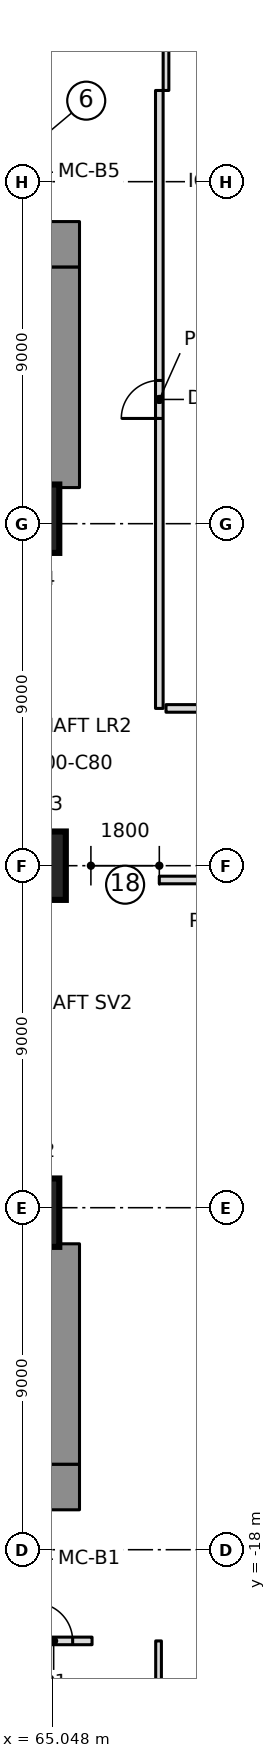
"""IFC4 building model, lengths in metres.
Left out: names, types, materials, properties, quantities, classifications, styles, units other than length and angle.
Written with IfcOpenShell. Run it as: python <this file> out.ifc"""

import sys

from ifc_helpers import new_model, si_unit, direction, frame, frame_2d, origin, origin_2d, place, context, subcontext, project, spatial, rectangle, extrude, element, fill, save


model = new_model("IFC4")
c1 = context("Model", 3, precision=1e-05, world=origin(), true_north=direction((0.0, 1.0)))
c2 = subcontext(c1, "Body", "Model", "MODEL_VIEW")
j1 = project(units=[si_unit("LENGTHUNIT", "METRE"), si_unit("PLANEANGLEUNIT", "RADIAN")], contexts=[c1])
p1 = place(None, origin())
s1 = spatial("IfcSite", under=j1, at=p1, CompositionType="ELEMENT")
p2 = place(p1, origin())
s2 = spatial("IfcBuilding", under=s1, at=p2, CompositionType="ELEMENT")
p3 = place(p2, origin())
s3 = spatial("IfcBuildingStorey", under=s2, at=p3, CompositionType="ELEMENT", Elevation=0.0)
for number, where, z_axis, x_axis in (
    (1, (50.7, 16.35, 0.0), (0.0, 0.0, 1.0), (1.0, 0.0, 0.0)),
    (2, (50.7, -16.35, 0.0), (0.0, 0.0, 1.0), (1.0, 0.0, 0.0)),
):
    element("IfcWall", number, at=place(p3, frame(where, z_axis=z_axis, x_axis=x_axis)), inside=s3, PredefinedType="SHEAR", context=c2, shape_type="SweptSolid", body=[
        extrude(rectangle(XDim=15.06, YDim=1.2, at=frame_2d((7.53, 0.0))), origin(), (0.0, 0.0, 1.0), 8.0),
    ])
for number, where, z_axis, x_axis in (
    (3, (65.16, 9.95, 0.0), (0.0, 0.0, 1.0), (0.0, 1.0, 0.0)),
    (4, (65.16, -15.75, 0.0), (0.0, 0.0, 1.0), (0.0, 1.0, 0.0)),
):
    element("IfcWall", number, at=place(p3, frame(where, z_axis=z_axis, x_axis=x_axis)), inside=s3, PredefinedType="SHEAR", context=c2, shape_type="SweptSolid", body=[
        extrude(rectangle(XDim=5.8, YDim=1.2, at=frame_2d((2.9, 0.0))), origin(), (0.0, 0.0, 1.0), 8.0),
    ])
for number, where, z_axis, x_axis in (
    (5, (64.328, -9.131, 0.0), (0.0, 0.0, 1.0), (1.0, 0.0, 0.0)),
    (6, (64.5, 0.0, 0.0), (0.0, 0.0, 1.0), (1.0, 0.0, 0.0)),
    (7, (64.328, 9.131, 0.0), (0.0, 0.0, 1.0), (1.0, 0.0, 0.0)),
):
    element("IfcColumn", number, at=place(p3, frame(where, z_axis=z_axis, x_axis=x_axis)), inside=s3, PredefinedType="COLUMN", context=c2, shape_type="SweptSolid", body=[
        extrude(rectangle(XDim=1.8, YDim=1.8, at=origin_2d()), origin(), (0.0, 0.0, 1.0), 8.0),
    ])
p4 = place(p3, frame((67.84, -36.6, 0.0), z_axis=(0.0, 0.0, 1.0), x_axis=(0.0, 1.0, 0.0)))
e8 = element("IfcWall", 8, at=p4, inside=s3, PredefinedType="PARTITIONING", context=c2, shape_type="SweptSolid", body=[
    extrude(rectangle(XDim=16.2, YDim=0.15, at=frame_2d((8.1, 0.0))), origin(), (0.0, 0.0, 1.0), 7.65),
])
p5 = place(p3, frame((67.859, -0.376, 0.0), z_axis=(0.0, 0.0, 1.0), x_axis=(1.0, 0.0, 0.0)))
e9 = element("IfcWall", 9, at=p5, inside=s3, PredefinedType="PARTITIONING", context=c2, shape_type="SweptSolid", body=[
    extrude(rectangle(XDim=3.381, YDim=0.2, at=frame_2d((1.69, 0.0))), origin(), (0.0, 0.0, 1.0), 7.65),
])
p6 = place(p5, frame((1.19, 0.0, 0.0)))
e10 = element("IfcOpeningElement", 10, at=p6, cuts=e9, PredefinedType="OPENING", context=c2, shape_type="SweptSolid", body=[
    extrude(rectangle(XDim=1.0, YDim=2.1, at=frame_2d((0.5, 1.05))), frame((0.0, 0.11, 0.0), z_axis=(0.0, -1.0, 0.0), x_axis=(1.0, 0.0, 0.0)), (0.0, 0.0, 1.0), 0.22),
])
p7 = place(p3, frame((68.036, 4.139, 0.0), z_axis=(0.0, 0.0, 1.0), x_axis=(1.0, 0.0, 0.0)))
e11 = element("IfcWall", 11, at=p7, inside=s3, PredefinedType="PARTITIONING", context=c2, shape_type="SweptSolid", body=[
    extrude(rectangle(XDim=4.595, YDim=0.2, at=frame_2d((2.297, 0.0))), origin(), (0.0, 0.0, 1.0), 7.65),
])
p8 = place(p7, frame((1.797, 0.0, 0.0)))
e12 = element("IfcOpeningElement", 12, at=p8, cuts=e11, PredefinedType="OPENING", context=c2, shape_type="SweptSolid", body=[
    extrude(rectangle(XDim=1.2, YDim=2.1, at=frame_2d((0.6, 1.05))), frame((0.0, 0.11, 0.0), z_axis=(0.0, -1.0, 0.0), x_axis=(1.0, 0.0, 0.0)), (0.0, 0.0, 1.0), 0.22),
])
p9 = place(p3, frame((63.08, -20.4, 0.0), z_axis=(0.0, 0.0, 1.0), x_axis=(1.0, 0.0, 0.0)))
e13 = element("IfcWall", 13, at=p9, inside=s3, PredefinedType="PARTITIONING", context=c2, shape_type="SweptSolid", body=[
    extrude(rectangle(XDim=3.01, YDim=0.2, at=frame_2d((1.505, 0.0))), origin(), (0.0, 0.0, 1.0), 7.65),
])
p10 = place(p9, frame((1.5, 0.0, 0.0)))
e14 = element("IfcOpeningElement", 14, at=p10, cuts=e13, PredefinedType="OPENING", context=c2, shape_type="SweptSolid", body=[
    extrude(rectangle(XDim=1.0, YDim=2.1, at=frame_2d((0.5, 1.05))), frame((0.0, 0.11, 0.0), z_axis=(0.0, -1.0, 0.0), x_axis=(1.0, 0.0, 0.0)), (0.0, 0.0, 1.0), 0.22),
])
p11 = place(p3, frame((67.86, 4.139, 0.0), z_axis=(0.0, 0.0, 1.0), x_axis=(0.0, 1.0, 0.0)))
e15 = element("IfcWall", 15, at=p11, inside=s3, PredefinedType="PARTITIONING", context=c2, shape_type="SweptSolid", body=[
    extrude(rectangle(XDim=16.261, YDim=0.2, at=frame_2d((8.131, 0.0))), origin(), (0.0, 0.0, 1.0), 7.65),
])
p12 = place(p11, frame((7.631, 0.0, 0.0)))
e16 = element("IfcOpeningElement", 16, at=p12, cuts=e15, PredefinedType="OPENING", context=c2, shape_type="SweptSolid", body=[
    extrude(rectangle(XDim=1.0, YDim=2.1, at=frame_2d((0.5, 1.05))), frame((0.0, 0.11, 0.0), z_axis=(0.0, -1.0, 0.0), x_axis=(1.0, 0.0, 0.0)), (0.0, 0.0, 1.0), 0.22),
])
p13 = place(p3, frame((68.036, 20.4, 0.0), z_axis=(0.0, 0.0, 1.0), x_axis=(0.0, 1.0, 0.0)))
e17 = element("IfcWall", 17, at=p13, inside=s3, PredefinedType="PARTITIONING", context=c2, shape_type="SweptSolid", body=[
    extrude(rectangle(XDim=16.17, YDim=0.15, at=frame_2d((8.085, 0.0))), origin(), (0.0, 0.0, 1.0), 7.65),
])
p14 = place(p10, origin())
e18 = element("IfcDoor", 18, at=p14, inside=s3, OperationType="SINGLE_SWING_LEFT", PredefinedType="DOOR", context=c2, shape_type="SweptSolid", body=[
    extrude(rectangle(XDim=1.0, YDim=2.1, at=frame_2d((0.5, 1.05))), frame((0.0, 0.025, 0.0), z_axis=(0.0, -1.0, 0.0), x_axis=(1.0, 0.0, 0.0)), (0.0, 0.0, 1.0), 0.05),
])
fill(e14, e18)
p15 = place(p12, origin())
e19 = element("IfcDoor", 19, at=p15, inside=s3, OperationType="SINGLE_SWING_LEFT", PredefinedType="DOOR", context=c2, shape_type="SweptSolid", body=[
    extrude(rectangle(XDim=1.0, YDim=2.1, at=frame_2d((0.5, 1.05))), frame((0.0, 0.025, 0.0), z_axis=(0.0, -1.0, 0.0), x_axis=(1.0, 0.0, 0.0)), (0.0, 0.0, 1.0), 0.05),
])
fill(e16, e19)
save(model, sys.argv[1])
